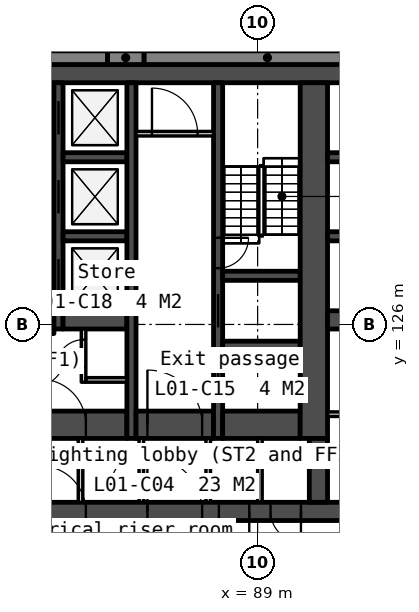
"""IFC4 building model, lengths in metres.
Left out: names, types, materials, properties, quantities, classifications, styles, units other than length and angle.
Written with IfcOpenShell. Run it as: python <this file> out.ifc"""

import sys

from ifc_helpers import new_model, si_unit, direction, frame, frame_2d, origin, place, context, subcontext, project, spatial, rectangle, extrude, element, fill, save


model = new_model("IFC4")
c1 = context("Model", 3, precision=1e-05, world=origin(), true_north=direction((0.0, 1.0)))
c2 = subcontext(c1, "Body", "Model", "MODEL_VIEW")
j1 = project(units=[si_unit("LENGTHUNIT", "METRE"), si_unit("PLANEANGLEUNIT", "RADIAN")], contexts=[c1])
p1 = place(None, origin())
s1 = spatial("IfcSite", under=j1, at=p1, CompositionType="ELEMENT")
p2 = place(p1, origin())
s2 = spatial("IfcBuilding", under=s1, at=p2, CompositionType="ELEMENT")
p3 = place(p2, frame((0.0, 0.0, 7.5)))
s3 = spatial("IfcBuildingStorey", under=s2, at=p3, CompositionType="ELEMENT", Elevation=7.5)
p4 = place(p3, frame((66.0, 134.25, 0.0), z_axis=(0.0, 0.0, 1.0), x_axis=(1.0, 0.0, 0.0)))
e1 = element("IfcWall", 1, at=p4, inside=s3, PredefinedType="SOLIDWALL", context=c2, shape_type="SweptSolid", body=[
    extrude(rectangle(XDim=28.0, YDim=0.6, at=frame_2d((14.0, 0.0))), origin(), (0.0, 0.0, 1.0), 5.7),
])
p5 = place(p3, frame((66.0, 119.85, 0.0), z_axis=(0.0, 0.0, 1.0), x_axis=(1.0, 0.0, 0.0)))
e2 = element("IfcWall", 2, at=p5, inside=s3, PredefinedType="SOLIDWALL", context=c2, shape_type="SweptSolid", body=[
    extrude(rectangle(XDim=28.0, YDim=0.6, at=frame_2d((14.0, 0.0))), origin(), (0.0, 0.0, 1.0), 5.7),
])
p6 = place(p5, frame((6.825, 0.0, 0.0)))
e3 = element("IfcOpeningElement", 3, at=p6, cuts=e2, PredefinedType="OPENING", context=c2, shape_type="SweptSolid", body=[
    extrude(rectangle(XDim=1.8, YDim=2.1, at=frame_2d((0.9, 1.05))), frame((0.0, 0.31, 0.0), z_axis=(0.0, -1.0, 0.0), x_axis=(1.0, 0.0, 0.0)), (0.0, 0.0, 1.0), 0.62),
])
p7 = place(p5, frame((15.85, 0.0, 0.0)))
e4 = element("IfcOpeningElement", 4, at=p7, cuts=e2, PredefinedType="OPENING", context=c2, shape_type="SweptSolid", body=[
    extrude(rectangle(XDim=1.5, YDim=2.1, at=frame_2d((0.75, 1.05))), frame((0.0, 0.31, 0.0), z_axis=(0.0, -1.0, 0.0), x_axis=(1.0, 0.0, 0.0)), (0.0, 0.0, 1.0), 0.62),
])
p8 = place(p5, frame((19.375, 0.0, 0.0)))
e5 = element("IfcOpeningElement", 5, at=p8, cuts=e2, PredefinedType="OPENING", context=c2, shape_type="SweptSolid", body=[
    extrude(rectangle(XDim=1.8, YDim=2.1, at=frame_2d((0.9, 1.05))), frame((0.0, 0.31, 0.0), z_axis=(0.0, -1.0, 0.0), x_axis=(1.0, 0.0, 0.0)), (0.0, 0.0, 1.0), 0.62),
])
p9 = place(p5, frame((4.425, 0.0, 0.0)))
e6 = element("IfcOpeningElement", 6, at=p9, cuts=e2, PredefinedType="OPENING", context=c2, shape_type="SweptSolid", body=[
    extrude(rectangle(XDim=1.0, YDim=2.1, at=frame_2d((0.5, 1.05))), frame((0.0, 0.31, 0.0), z_axis=(0.0, -1.0, 0.0), x_axis=(1.0, 0.0, 0.0)), (0.0, 0.0, 1.0), 0.62),
])
p10 = place(p5, frame((9.783, 0.0, 0.0)))
e7 = element("IfcOpeningElement", 7, at=p10, cuts=e2, PredefinedType="OPENING", context=c2, shape_type="SweptSolid", body=[
    extrude(rectangle(XDim=1.0, YDim=2.1, at=frame_2d((0.5, 1.05))), frame((0.0, 0.31, 0.0), z_axis=(0.0, -1.0, 0.0), x_axis=(1.0, 0.0, 0.0)), (0.0, 0.0, 1.0), 0.62),
])
p11 = place(p5, frame((11.525, 0.0, 0.0)))
e8 = element("IfcOpeningElement", 8, at=p11, cuts=e2, PredefinedType="OPENING", context=c2, shape_type="SweptSolid", body=[
    extrude(rectangle(XDim=1.0, YDim=2.1, at=frame_2d((0.5, 1.05))), frame((0.0, 0.31, 0.0), z_axis=(0.0, -1.0, 0.0), x_axis=(1.0, 0.0, 0.0)), (0.0, 0.0, 1.0), 0.62),
])
p12 = place(p5, frame((13.658, 0.0, 0.0)))
e9 = element("IfcOpeningElement", 9, at=p12, cuts=e2, PredefinedType="OPENING", context=c2, shape_type="SweptSolid", body=[
    extrude(rectangle(XDim=1.0, YDim=2.1, at=frame_2d((0.5, 1.05))), frame((0.0, 0.31, 0.0), z_axis=(0.0, -1.0, 0.0), x_axis=(1.0, 0.0, 0.0)), (0.0, 0.0, 1.0), 0.62),
])
p13 = place(p5, frame((21.725, 0.0, 0.0)))
e10 = element("IfcOpeningElement", 10, at=p13, cuts=e2, PredefinedType="OPENING", context=c2, shape_type="SweptSolid", body=[
    extrude(rectangle(XDim=1.0, YDim=2.1, at=frame_2d((0.5, 1.05))), frame((0.0, 0.31, 0.0), z_axis=(0.0, -1.0, 0.0), x_axis=(1.0, 0.0, 0.0)), (0.0, 0.0, 1.0), 0.62),
])
p14 = place(p5, frame((23.425, 0.0, 0.0)))
e11 = element("IfcOpeningElement", 11, at=p14, cuts=e2, PredefinedType="OPENING", context=c2, shape_type="SweptSolid", body=[
    extrude(rectangle(XDim=1.0, YDim=2.1, at=frame_2d((0.5, 1.05))), frame((0.0, 0.31, 0.0), z_axis=(0.0, -1.0, 0.0), x_axis=(1.0, 0.0, 0.0)), (0.0, 0.0, 1.0), 0.62),
])
p15 = place(p3, frame((77.7, 125.85, 0.0), z_axis=(0.0, 0.0, 1.0), x_axis=(1.0, 0.0, 0.0)))
e12 = element("IfcWall", 12, at=p15, inside=s3, PredefinedType="SOLIDWALL", context=c2, shape_type="SweptSolid", body=[
    extrude(rectangle(XDim=4.6, YDim=0.3, at=frame_2d((2.3, 0.0))), origin(), (0.0, 0.0, 1.0), 5.7),
])
p16 = place(p3, frame((81.8, 122.7, 0.0), z_axis=(0.0, 0.0, 1.0), x_axis=(1.0, 0.0, 0.0)))
e13 = element("IfcWall", 13, at=p16, inside=s3, PredefinedType="SOLIDWALL", context=c2, shape_type="SweptSolid", body=[
    extrude(rectangle(XDim=2.9, YDim=0.9, at=frame_2d((1.45, 0.0))), origin(), (0.0, 0.0, 1.0), 5.7),
])
p17 = place(p16, frame((0.05, 0.0, 0.0)))
e14 = element("IfcOpeningElement", 14, at=p17, cuts=e13, PredefinedType="OPENING", context=c2, shape_type="SweptSolid", body=[
    extrude(rectangle(XDim=1.5, YDim=2.1, at=frame_2d((0.75, 1.05))), frame((0.0, 0.46, 0.0), z_axis=(0.0, -1.0, 0.0), x_axis=(1.0, 0.0, 0.0)), (0.0, 0.0, 1.0), 0.92),
])
p18 = place(p3, frame((82.45, 133.95, 0.0), z_axis=(0.0, 0.0, 1.0), x_axis=(0.0, -1.0, 0.0)))
e15 = element("IfcWall", 15, at=p18, inside=s3, PredefinedType="SOLIDWALL", context=c2, shape_type="SweptSolid", body=[
    extrude(rectangle(XDim=8.1, YDim=0.3, at=frame_2d((4.05, 0.0))), origin(), (0.0, 0.0, 1.0), 5.7),
])
p19 = place(p18, frame((0.6, 0.0, 0.0)))
e16 = element("IfcOpeningElement", 16, at=p19, cuts=e15, PredefinedType="OPENING", context=c2, shape_type="SweptSolid", body=[
    extrude(rectangle(XDim=1.1, YDim=2.1, at=frame_2d((0.55, 1.05))), frame((0.0, 0.16, 0.0), z_axis=(0.0, -1.0, 0.0), x_axis=(1.0, 0.0, 0.0)), (0.0, 0.0, 1.0), 0.32),
])
p20 = place(p18, frame((3.2, 0.0, 0.0)))
e17 = element("IfcOpeningElement", 17, at=p20, cuts=e15, PredefinedType="OPENING", context=c2, shape_type="SweptSolid", body=[
    extrude(rectangle(XDim=1.1, YDim=2.1, at=frame_2d((0.55, 1.05))), frame((0.0, 0.16, 0.0), z_axis=(0.0, -1.0, 0.0), x_axis=(1.0, 0.0, 0.0)), (0.0, 0.0, 1.0), 0.32),
])
p21 = place(p18, frame((5.8, 0.0, 0.0)))
e18 = element("IfcOpeningElement", 18, at=p21, cuts=e15, PredefinedType="OPENING", context=c2, shape_type="SweptSolid", body=[
    extrude(rectangle(XDim=1.1, YDim=2.1, at=frame_2d((0.55, 1.05))), frame((0.0, 0.16, 0.0), z_axis=(0.0, -1.0, 0.0), x_axis=(1.0, 0.0, 0.0)), (0.0, 0.0, 1.0), 0.32),
])
for number, where, z_axis, x_axis in (
    (19, (82.6, 131.5, 0.0), (0.0, 0.0, 1.0), (1.0, 0.0, 0.0)),
    (20, (82.6, 128.9, 0.0), (0.0, 0.0, 1.0), (1.0, 0.0, 0.0)),
):
    element("IfcWall", number, at=place(p3, frame(where, z_axis=z_axis, x_axis=x_axis)), inside=s3, PredefinedType="SOLIDWALL", context=c2, shape_type="SweptSolid", body=[
        extrude(rectangle(XDim=2.1, YDim=0.3, at=frame_2d((1.05, 0.0))), origin(), (0.0, 0.0, 1.0), 5.7),
    ])
p22 = place(p3, frame((82.6, 126.15, 0.0), z_axis=(0.0, 0.0, 1.0), x_axis=(1.0, 0.0, 0.0)))
e21 = element("IfcWall", 21, at=p22, inside=s3, PredefinedType="SOLIDWALL", context=c2, shape_type="SweptSolid", body=[
    extrude(rectangle(XDim=2.1, YDim=0.6, at=frame_2d((1.05, 0.0))), origin(), (0.0, 0.0, 1.0), 5.7),
])
p23 = place(p3, frame((83.175, 122.25, 0.0), z_axis=(0.0, 0.0, 1.0), x_axis=(0.0, -1.0, 0.0)))
e22 = element("IfcWall", 22, at=p23, inside=s3, PredefinedType="PARTITIONING", context=c2, shape_type="SweptSolid", body=[
    extrude(rectangle(XDim=2.1, YDim=0.15, at=frame_2d((1.05, 0.0))), origin(), (0.0, 0.0, 1.0), 5.7),
])
p24 = place(p3, frame((83.275, 125.85, 0.0), z_axis=(0.0, 0.0, 1.0), x_axis=(0.0, -1.0, 0.0)))
e23 = element("IfcWall", 23, at=p24, inside=s3, PredefinedType="PARTITIONING", context=c2, shape_type="SweptSolid", body=[
    extrude(rectangle(XDim=1.75, YDim=0.15, at=frame_2d((0.875, 0.0))), origin(), (0.0, 0.0, 1.0), 5.7),
])
p25 = place(p24, frame((0.35, 0.0, 0.0)))
e24 = element("IfcOpeningElement", 24, at=p25, cuts=e23, PredefinedType="OPENING", context=c2, shape_type="SweptSolid", body=[
    extrude(rectangle(XDim=0.9, YDim=2.1, at=frame_2d((0.45, 1.05))), frame((0.0, 0.085, 0.0), z_axis=(0.0, -1.0, 0.0), x_axis=(1.0, 0.0, 0.0)), (0.0, 0.0, 1.0), 0.17),
])
p26 = place(p3, frame((83.35, 124.175, 0.0), z_axis=(0.0, 0.0, 1.0), x_axis=(1.0, 0.0, 0.0)))
e25 = element("IfcWall", 25, at=p26, inside=s3, PredefinedType="PARTITIONING", context=c2, shape_type="SweptSolid", body=[
    extrude(rectangle(XDim=1.35, YDim=0.15, at=frame_2d((0.675, 0.0))), origin(), (0.0, 0.0, 1.0), 5.7),
])
p27 = place(p3, frame((84.85, 133.95, 0.0), z_axis=(0.0, 0.0, 1.0), x_axis=(0.0, -1.0, 0.0)))
e26 = element("IfcWall", 26, at=p27, inside=s3, PredefinedType="SOLIDWALL", context=c2, shape_type="SweptSolid", body=[
    extrude(rectangle(XDim=11.7, YDim=0.3, at=frame_2d((5.85, 0.0))), origin(), (0.0, 0.0, 1.0), 5.7),
])
p28 = place(p3, frame((85.0, 132.275, 0.0), z_axis=(0.0, 0.0, 1.0), x_axis=(1.0, 0.0, 0.0)))
e27 = element("IfcWall", 27, at=p28, inside=s3, PredefinedType="PARTITIONING", context=c2, shape_type="SweptSolid", body=[
    extrude(rectangle(XDim=2.55, YDim=0.15, at=frame_2d((1.275, 0.0))), origin(), (0.0, 0.0, 1.0), 5.7),
])
p29 = place(p28, frame((0.525, 0.0, 0.0)))
e28 = element("IfcOpeningElement", 28, at=p29, cuts=e27, PredefinedType="OPENING", context=c2, shape_type="SweptSolid", body=[
    extrude(rectangle(XDim=1.5, YDim=2.1, at=frame_2d((0.75, 1.05))), frame((0.0, 0.085, 0.0), z_axis=(0.0, -1.0, 0.0), x_axis=(1.0, 0.0, 0.0)), (0.0, 0.0, 1.0), 0.17),
])
p30 = place(p3, frame((85.0, 122.7, 0.0), z_axis=(0.0, 0.0, 1.0), x_axis=(1.0, 0.0, 0.0)))
e29 = element("IfcWall", 29, at=p30, inside=s3, PredefinedType="SOLIDWALL", context=c2, shape_type="SweptSolid", body=[
    extrude(rectangle(XDim=2.55, YDim=0.9, at=frame_2d((1.275, 0.0))), origin(), (0.0, 0.0, 1.0), 5.7),
])
p31 = place(p30, frame((0.375, 0.0, 0.0)))
e30 = element("IfcOpeningElement", 30, at=p31, cuts=e29, PredefinedType="OPENING", context=c2, shape_type="SweptSolid", body=[
    extrude(rectangle(XDim=1.8, YDim=2.1, at=frame_2d((0.9, 1.05))), frame((0.0, 0.46, 0.0), z_axis=(0.0, -1.0, 0.0), x_axis=(1.0, 0.0, 0.0)), (0.0, 0.0, 1.0), 0.92),
])
p32 = place(p3, frame((85.175, 122.25, 0.0), z_axis=(0.0, 0.0, 1.0), x_axis=(0.0, -1.0, 0.0)))
e31 = element("IfcWall", 31, at=p32, inside=s3, PredefinedType="PARTITIONING", context=c2, shape_type="SweptSolid", body=[
    extrude(rectangle(XDim=2.1, YDim=0.15, at=frame_2d((1.05, 0.0))), origin(), (0.0, 0.0, 1.0), 5.7),
])
p33 = place(p32, frame((0.55, 0.0, 0.0)))
e32 = element("IfcOpeningElement", 32, at=p33, cuts=e31, PredefinedType="OPENING", context=c2, shape_type="SweptSolid", body=[
    extrude(rectangle(XDim=1.0, YDim=2.1, at=frame_2d((0.5, 1.05))), frame((0.0, 0.085, 0.0), z_axis=(0.0, -1.0, 0.0), x_axis=(1.0, 0.0, 0.0)), (0.0, 0.0, 1.0), 0.17),
])
p34 = place(p3, frame((87.375, 122.25, 0.0), z_axis=(0.0, 0.0, 1.0), x_axis=(0.0, -1.0, 0.0)))
e33 = element("IfcWall", 33, at=p34, inside=s3, PredefinedType="PARTITIONING", context=c2, shape_type="SweptSolid", body=[
    extrude(rectangle(XDim=2.1, YDim=0.15, at=frame_2d((1.05, 0.0))), origin(), (0.0, 0.0, 1.0), 5.7),
])
p35 = place(p3, frame((87.7, 133.95, 0.0), z_axis=(0.0, 0.0, 1.0), x_axis=(0.0, -1.0, 0.0)))
e34 = element("IfcWall", 34, at=p35, inside=s3, PredefinedType="SOLIDWALL", context=c2, shape_type="SweptSolid", body=[
    extrude(rectangle(XDim=11.7, YDim=0.3, at=frame_2d((5.85, 0.0))), origin(), (0.0, 0.0, 1.0), 5.7),
])
p36 = place(p35, frame((6.95, 0.0, 0.0)))
e35 = element("IfcOpeningElement", 35, at=p36, cuts=e34, PredefinedType="OPENING", context=c2, shape_type="SweptSolid", body=[
    extrude(rectangle(XDim=1.1, YDim=2.1, at=frame_2d((0.55, 1.05))), frame((0.0, 0.16, 0.0), z_axis=(0.0, -1.0, 0.0), x_axis=(1.0, 0.0, 0.0)), (0.0, 0.0, 1.0), 0.32),
])
p37 = place(p35, frame((5.1, 0.0, 0.0)))
e36 = element("IfcOpeningElement", 36, at=p37, cuts=e34, PredefinedType="OPENING", context=c2, shape_type="SweptSolid", body=[
    extrude(rectangle(XDim=1.0, YDim=2.1, at=frame_2d((0.5, 1.05))), frame((0.0, 0.16, 0.0), z_axis=(0.0, -1.0, 0.0), x_axis=(1.0, 0.0, 0.0)), (0.0, 0.0, 1.0), 0.32),
])
p38 = place(p35, frame((9.25, 0.0, 0.0)))
e37 = element("IfcOpeningElement", 37, at=p38, cuts=e34, PredefinedType="OPENING", context=c2, shape_type="SweptSolid", body=[
    extrude(rectangle(XDim=1.1, YDim=2.1, at=frame_2d((0.55, 1.05))), frame((0.0, 0.16, 0.0), z_axis=(0.0, -1.0, 0.0), x_axis=(1.0, 0.0, 0.0)), (0.0, 0.0, 1.0), 0.32),
])
for number, where, z_axis, x_axis in (
    (38, (87.85, 127.6, 0.0), (0.0, 0.0, 1.0), (1.0, 0.0, 0.0)),
    (39, (87.85, 125.3, 0.0), (0.0, 0.0, 1.0), (1.0, 0.0, 0.0)),
):
    element("IfcWall", number, at=place(p3, frame(where, z_axis=z_axis, x_axis=x_axis)), inside=s3, PredefinedType="SOLIDWALL", context=c2, shape_type="SweptSolid", body=[
        extrude(rectangle(XDim=2.55, YDim=0.3, at=frame_2d((1.275, 0.0))), origin(), (0.0, 0.0, 1.0), 5.7),
    ])
p39 = place(p3, frame((87.85, 122.7, 0.0), z_axis=(0.0, 0.0, 1.0), x_axis=(1.0, 0.0, 0.0)))
e40 = element("IfcWall", 40, at=p39, inside=s3, PredefinedType="SOLIDWALL", context=c2, shape_type="SweptSolid", body=[
    extrude(rectangle(XDim=2.55, YDim=0.9, at=frame_2d((1.275, 0.0))), origin(), (0.0, 0.0, 1.0), 5.7),
])
p40 = place(p3, frame((89.075, 122.25, 0.0), z_axis=(0.0, 0.0, 1.0), x_axis=(0.0, -1.0, 0.0)))
e41 = element("IfcWall", 41, at=p40, inside=s3, PredefinedType="PARTITIONING", context=c2, shape_type="SweptSolid", body=[
    extrude(rectangle(XDim=2.1, YDim=0.15, at=frame_2d((1.05, 0.0))), origin(), (0.0, 0.0, 1.0), 5.7),
])
p41 = place(p3, frame((90.85, 133.95, 0.0), z_axis=(0.0, 0.0, 1.0), x_axis=(0.0, -1.0, 0.0)))
e42 = element("IfcWall", 42, at=p41, inside=s3, PredefinedType="SOLIDWALL", context=c2, shape_type="SweptSolid", body=[
    extrude(rectangle(XDim=11.7, YDim=0.9, at=frame_2d((5.85, 0.0))), origin(), (0.0, 0.0, 1.0), 5.7),
])
p42 = place(p3, frame((91.0, 122.25, 0.0), z_axis=(0.0, 0.0, 1.0), x_axis=(0.0, -1.0, 0.0)))
e43 = element("IfcWall", 43, at=p42, inside=s3, PredefinedType="SOLIDWALL", context=c2, shape_type="SweptSolid", body=[
    extrude(rectangle(XDim=2.1, YDim=0.6, at=frame_2d((1.05, 0.0))), origin(), (0.0, 0.0, 1.0), 5.7),
])
for number, where, z_axis, x_axis in (
    (44, (91.3, 131.5, 0.0), (0.0, 0.0, 1.0), (1.0, 0.0, 0.0)),
    (45, (91.3, 128.9, 0.0), (0.0, 0.0, 1.0), (1.0, 0.0, 0.0)),
):
    element("IfcWall", number, at=place(p3, frame(where, z_axis=z_axis, x_axis=x_axis)), inside=s3, PredefinedType="SOLIDWALL", context=c2, shape_type="SweptSolid", body=[
        extrude(rectangle(XDim=2.1, YDim=0.3, at=frame_2d((1.05, 0.0))), origin(), (0.0, 0.0, 1.0), 5.7),
    ])
p43 = place(p3, frame((91.3, 126.15, 0.0), z_axis=(0.0, 0.0, 1.0), x_axis=(1.0, 0.0, 0.0)))
e46 = element("IfcWall", 46, at=p43, inside=s3, PredefinedType="SOLIDWALL", context=c2, shape_type="SweptSolid", body=[
    extrude(rectangle(XDim=2.1, YDim=0.6, at=frame_2d((1.05, 0.0))), origin(), (0.0, 0.0, 1.0), 5.7),
])
p44 = place(p3, frame((91.3, 123.049, 0.0), z_axis=(0.0, 0.0, 1.0), x_axis=(1.0, 0.0, 0.0)))
e47 = element("IfcWall", 47, at=p44, inside=s3, PredefinedType="PARTITIONING", context=c2, shape_type="SweptSolid", body=[
    extrude(rectangle(XDim=2.1, YDim=0.15, at=frame_2d((1.05, 0.0))), origin(), (0.0, 0.0, 1.0), 5.7),
])
p45 = place(p3, frame((93.382, 134.775, -0.3), z_axis=(0.0, 0.0, 1.0), x_axis=(-1.0, 0.0, 0.0)))
e48 = element("IfcWall", 48, at=p45, inside=s3, PredefinedType="SOLIDWALL", context=c2, shape_type="SweptSolid", body=[
    extrude(rectangle(XDim=8.121, YDim=0.45, at=frame_2d((4.061, 0.0))), origin(), (0.0, 0.0, 1.0), 5.312),
])
p46 = place(p3, frame((85.261, 134.775, -0.3), z_axis=(0.0, 0.0, 1.0), x_axis=(-1.0, 0.0, 0.0)))
e49 = element("IfcWall", 49, at=p46, inside=s3, PredefinedType="SOLIDWALL", context=c2, shape_type="SweptSolid", body=[
    extrude(rectangle(XDim=1.2, YDim=0.45, at=frame_2d((0.6, 0.0))), origin(), (0.0, 0.0, 1.0), 5.312),
])
p47 = place(p3, frame((84.061, 134.775, -0.3), z_axis=(0.0, 0.0, 1.0), x_axis=(-1.0, 0.0, 0.0)))
e50 = element("IfcWall", 50, at=p47, inside=s3, PredefinedType="SOLIDWALL", context=c2, shape_type="SweptSolid", body=[
    extrude(rectangle(XDim=8.122, YDim=0.45, at=frame_2d((4.061, 0.0))), origin(), (0.0, 0.0, 1.0), 5.312),
])
p48 = place(p19, origin())
e51 = element("IfcDoor", 51, at=p48, inside=s3, OperationType="SLIDING_TO_LEFT", PredefinedType="DOOR", context=c2, shape_type="SweptSolid", body=[
    extrude(rectangle(XDim=1.1, YDim=2.1, at=frame_2d((0.55, 1.05))), frame((0.0, 0.025, 0.0), z_axis=(0.0, -1.0, 0.0), x_axis=(1.0, 0.0, 0.0)), (0.0, 0.0, 1.0), 0.05),
])
fill(e16, e51)
p49 = place(p20, origin())
e52 = element("IfcDoor", 52, at=p49, inside=s3, OperationType="SLIDING_TO_LEFT", PredefinedType="DOOR", context=c2, shape_type="SweptSolid", body=[
    extrude(rectangle(XDim=1.1, YDim=2.1, at=frame_2d((0.55, 1.05))), frame((0.0, 0.025, 0.0), z_axis=(0.0, -1.0, 0.0), x_axis=(1.0, 0.0, 0.0)), (0.0, 0.0, 1.0), 0.05),
])
fill(e17, e52)
p50 = place(p21, origin())
e53 = element("IfcDoor", 53, at=p50, inside=s3, OperationType="SLIDING_TO_LEFT", PredefinedType="DOOR", context=c2, shape_type="SweptSolid", body=[
    extrude(rectangle(XDim=1.1, YDim=2.1, at=frame_2d((0.55, 1.05))), frame((0.0, 0.025, 0.0), z_axis=(0.0, -1.0, 0.0), x_axis=(1.0, 0.0, 0.0)), (0.0, 0.0, 1.0), 0.05),
])
fill(e18, e53)
p51 = place(p36, origin())
e54 = element("IfcDoor", 54, at=p51, inside=s3, OperationType="SLIDING_TO_LEFT", PredefinedType="DOOR", context=c2, shape_type="SweptSolid", body=[
    extrude(rectangle(XDim=1.1, YDim=2.1, at=frame_2d((0.55, 1.05))), frame((0.0, 0.025, 0.0), z_axis=(0.0, -1.0, 0.0), x_axis=(1.0, 0.0, 0.0)), (0.0, 0.0, 1.0), 0.05),
])
fill(e35, e54)
p52 = place(p31, origin())
e55 = element("IfcDoor", 55, at=p52, inside=s3, OperationType="DOUBLE_DOOR_DOUBLE_SWING", PredefinedType="DOOR", context=c2, shape_type="SweptSolid", body=[
    extrude(rectangle(XDim=1.8, YDim=2.1, at=frame_2d((0.9, 1.05))), frame((0.0, 0.025, 0.0), z_axis=(0.0, -1.0, 0.0), x_axis=(1.0, 0.0, 0.0)), (0.0, 0.0, 1.0), 0.05),
])
fill(e30, e55)
p53 = place(p17, origin())
e56 = element("IfcDoor", 56, at=p53, inside=s3, OperationType="DOUBLE_DOOR_DOUBLE_SWING", PredefinedType="DOOR", context=c2, shape_type="SweptSolid", body=[
    extrude(rectangle(XDim=1.5, YDim=2.1, at=frame_2d((0.75, 1.05))), frame((0.0, 0.025, 0.0), z_axis=(0.0, -1.0, 0.0), x_axis=(1.0, 0.0, 0.0)), (0.0, 0.0, 1.0), 0.05),
])
fill(e14, e56)
p54 = place(p7, origin())
e57 = element("IfcDoor", 57, at=p54, inside=s3, OperationType="DOUBLE_DOOR_DOUBLE_SWING", PredefinedType="DOOR", context=c2, shape_type="SweptSolid", body=[
    extrude(rectangle(XDim=1.5, YDim=2.1, at=frame_2d((0.75, 1.05))), frame((0.0, 0.025, 0.0), z_axis=(0.0, -1.0, 0.0), x_axis=(1.0, 0.0, 0.0)), (0.0, 0.0, 1.0), 0.05),
])
fill(e4, e57)
p55 = place(p8, origin())
e58 = element("IfcDoor", 58, at=p55, inside=s3, OperationType="DOUBLE_DOOR_DOUBLE_SWING", PredefinedType="DOOR", context=c2, shape_type="SweptSolid", body=[
    extrude(rectangle(XDim=1.8, YDim=2.1, at=frame_2d((0.9, 1.05))), frame((0.0, 0.025, 0.0), z_axis=(0.0, -1.0, 0.0), x_axis=(1.0, 0.0, 0.0)), (0.0, 0.0, 1.0), 0.05),
])
fill(e5, e58)
p56 = place(p25, origin())
e59 = element("IfcDoor", 59, at=p56, inside=s3, OperationType="SINGLE_SWING_RIGHT", PredefinedType="DOOR", context=c2, shape_type="SweptSolid", body=[
    extrude(rectangle(XDim=0.9, YDim=2.1, at=frame_2d((0.45, 1.05))), frame((0.0, 0.025, 0.0), z_axis=(0.0, -1.0, 0.0), x_axis=(1.0, 0.0, 0.0)), (0.0, 0.0, 1.0), 0.05),
])
fill(e24, e59)
p57 = place(p29, origin())
e60 = element("IfcDoor", 60, at=p57, inside=s3, OperationType="DOUBLE_DOOR_DOUBLE_SWING", PredefinedType="DOOR", context=c2, shape_type="SweptSolid", body=[
    extrude(rectangle(XDim=1.5, YDim=2.1, at=frame_2d((0.75, 1.05))), frame((0.0, 0.025, 0.0), z_axis=(0.0, -1.0, 0.0), x_axis=(1.0, 0.0, 0.0)), (0.0, 0.0, 1.0), 0.05),
])
fill(e28, e60)
p58 = place(p33, origin())
e61 = element("IfcDoor", 61, at=p58, inside=s3, OperationType="SINGLE_SWING_RIGHT", PredefinedType="DOOR", context=c2, shape_type="SweptSolid", body=[
    extrude(rectangle(XDim=1.0, YDim=2.1, at=frame_2d((0.5, 1.05))), frame((0.0, 0.025, 0.0), z_axis=(0.0, -1.0, 0.0), x_axis=(1.0, 0.0, 0.0)), (0.0, 0.0, 1.0), 0.05),
])
fill(e32, e61)
p59 = place(p13, origin())
e62 = element("IfcDoor", 62, at=p59, inside=s3, OperationType="SINGLE_SWING_RIGHT", PredefinedType="DOOR", context=c2, shape_type="SweptSolid", body=[
    extrude(rectangle(XDim=1.0, YDim=2.1, at=frame_2d((0.5, 1.05))), frame((0.0, 0.025, 0.0), z_axis=(0.0, -1.0, 0.0), x_axis=(1.0, 0.0, 0.0)), (0.0, 0.0, 1.0), 0.05),
])
fill(e10, e62)
p60 = place(p14, origin())
e63 = element("IfcDoor", 63, at=p60, inside=s3, OperationType="SINGLE_SWING_RIGHT", PredefinedType="DOOR", context=c2, shape_type="SweptSolid", body=[
    extrude(rectangle(XDim=1.0, YDim=2.1, at=frame_2d((0.5, 1.05))), frame((0.0, 0.025, 0.0), z_axis=(0.0, -1.0, 0.0), x_axis=(1.0, 0.0, 0.0)), (0.0, 0.0, 1.0), 0.05),
])
fill(e11, e63)
p61 = place(p37, origin())
e64 = element("IfcDoor", 64, at=p61, inside=s3, OperationType="SINGLE_SWING_LEFT", PredefinedType="DOOR", context=c2, shape_type="SweptSolid", body=[
    extrude(rectangle(XDim=1.0, YDim=2.1, at=frame_2d((0.5, 1.05))), frame((0.0, 0.025, 0.0), z_axis=(0.0, -1.0, 0.0), x_axis=(1.0, 0.0, 0.0)), (0.0, 0.0, 1.0), 0.05),
])
fill(e36, e64)
p62 = place(p38, origin())
e65 = element("IfcDoor", 65, at=p62, inside=s3, OperationType="SLIDING_TO_LEFT", PredefinedType="DOOR", context=c2, shape_type="SweptSolid", body=[
    extrude(rectangle(XDim=1.1, YDim=2.1, at=frame_2d((0.55, 1.05))), frame((0.0, 0.025, 0.0), z_axis=(0.0, -1.0, 0.0), x_axis=(1.0, 0.0, 0.0)), (0.0, 0.0, 1.0), 0.05),
])
fill(e37, e65)
save(model, sys.argv[1])
